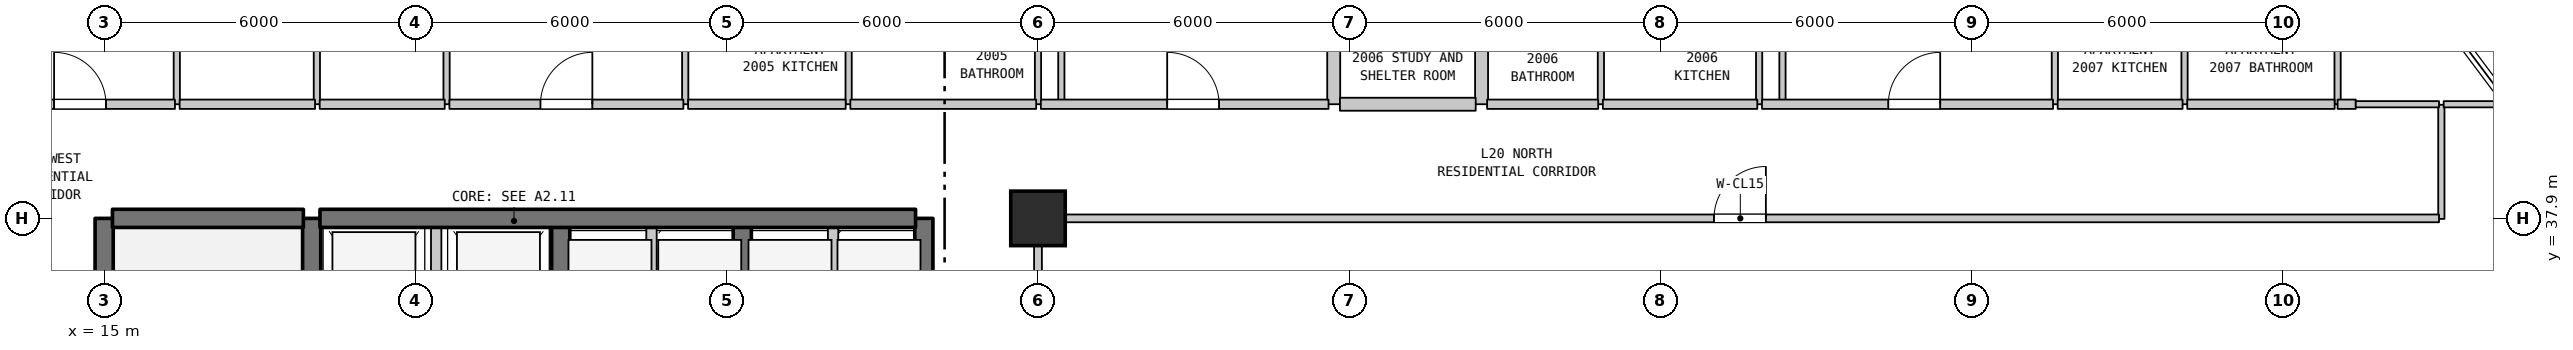
"""IFC4 building model, lengths in metres.
Left out: names, types, materials, properties, quantities, classifications, styles, units other than length and angle.
Written with IfcOpenShell. Run it as: python <this file> out.ifc"""

import sys

from ifc_helpers import new_model, si_unit, direction, frame, frame_2d, origin, origin_2d, place, context, subcontext, project, spatial, rectangle, extrude, element, fill, save


model = new_model("IFC4")
c1 = context("Model", 3, precision=1e-05, world=origin(), true_north=direction((0.0, 1.0)))
c2 = subcontext(c1, "Body", "Model", "MODEL_VIEW")
j1 = project(units=[si_unit("LENGTHUNIT", "METRE"), si_unit("PLANEANGLEUNIT", "RADIAN")], contexts=[c1])
p1 = place(None, origin())
s1 = spatial("IfcSite", under=j1, at=p1, CompositionType="ELEMENT")
p2 = place(p1, origin())
s2 = spatial("IfcBuilding", under=s1, at=p2, CompositionType="ELEMENT")
p3 = place(p2, frame((0.0, 0.0, 86.4)))
s3 = spatial("IfcBuildingStorey", under=s2, at=p3, CompositionType="ELEMENT", Elevation=86.4)
p4 = place(p3, frame((33.0, 37.9, 0.0), z_axis=(0.0, 0.0, 1.0), x_axis=(1.0, 0.0, 0.0)))
e1 = element("IfcColumn", 1, at=p4, inside=s3, PredefinedType="COLUMN", context=c2, shape_type="SweptSolid", body=[
    extrude(rectangle(XDim=1.05, YDim=1.05, at=origin_2d()), origin(), (0.0, 0.0, 1.0), 4.5),
])
p5 = place(p3, frame((15.0, 31.1, 0.0), z_axis=(0.0, 0.0, 1.0), x_axis=(0.0, 1.0, 0.0)))
e2 = element("IfcWall", 2, at=p5, inside=s3, PredefinedType="SHEAR", context=c2, shape_type="SweptSolid", body=[
    extrude(rectangle(XDim=6.8, YDim=0.35, at=frame_2d((3.4, 0.0))), origin(), (0.0, 0.0, 1.0), 4.185),
])
p6 = place(p3, frame((16.4, 40.1, 0.0), z_axis=(0.0, 0.0, 1.0), x_axis=(0.0, 1.0, 0.0)))
e3 = element("IfcWall", 3, at=p6, inside=s3, PredefinedType="PARTITIONING", context=c2, shape_type="SweptSolid", body=[
    extrude(rectangle(XDim=3.2, YDim=0.12, at=frame_2d((1.6, 0.0))), origin(), (0.0, 0.0, 1.0), 4.185),
])
p7 = place(p3, frame((19.0, 35.0, 0.0), z_axis=(0.0, 0.0, 1.0), x_axis=(0.0, 1.0, 0.0)))
e4 = element("IfcWall", 4, at=p7, inside=s3, PredefinedType="SHEAR", context=c2, shape_type="SweptSolid", body=[
    extrude(rectangle(XDim=2.9, YDim=0.35, at=frame_2d((1.45, 0.0))), origin(), (0.0, 0.0, 1.0), 4.185),
])
p8 = place(p3, frame((19.1, 40.1, 0.0), z_axis=(0.0, 0.0, 1.0), x_axis=(0.0, 1.0, 0.0)))
e5 = element("IfcWall", 5, at=p8, inside=s3, PredefinedType="PARTITIONING", context=c2, shape_type="SweptSolid", body=[
    extrude(rectangle(XDim=3.2, YDim=0.12, at=frame_2d((1.6, 0.0))), origin(), (0.0, 0.0, 1.0), 4.185),
])
p9 = place(p8, frame((1.15, 0.0, 0.0)))
e6 = element("IfcOpeningElement", 6, at=p9, cuts=e5, PredefinedType="OPENING", context=c2, shape_type="SweptSolid", body=[
    extrude(rectangle(XDim=0.9, YDim=2.15, at=frame_2d((0.45, 1.075))), frame((0.0, 0.07, 0.0), z_axis=(0.0, -1.0, 0.0), x_axis=(1.0, 0.0, 0.0)), (0.0, 0.0, 1.0), 0.14),
])
p10 = place(p3, frame((21.4, 35.0, 0.0), z_axis=(0.0, 0.0, 1.0), x_axis=(0.0, 1.0, 0.0)))
e7 = element("IfcWall", 7, at=p10, inside=s3, PredefinedType="STANDARD", context=c2, shape_type="SweptSolid", body=[
    extrude(rectangle(XDim=2.9, YDim=0.2, at=frame_2d((1.45, 0.0))), origin(), (0.0, 0.0, 1.0), 4.185),
])
p11 = place(p3, frame((21.6, 40.1, 0.0), z_axis=(0.0, 0.0, 1.0), x_axis=(0.0, 1.0, 0.0)))
e8 = element("IfcWall", 8, at=p11, inside=s3, PredefinedType="PARTITIONING", context=c2, shape_type="SweptSolid", body=[
    extrude(rectangle(XDim=13.79, YDim=0.12, at=frame_2d((6.895, 0.0))), origin(), (0.0, 0.0, 1.0), 4.185),
])
p12 = place(p3, frame((23.8, 35.0, 0.0), z_axis=(0.0, 0.0, 1.0), x_axis=(0.0, 1.0, 0.0)))
e9 = element("IfcWall", 9, at=p12, inside=s3, PredefinedType="SHEAR", context=c2, shape_type="SweptSolid", body=[
    extrude(rectangle(XDim=2.9, YDim=0.35, at=frame_2d((1.45, 0.0))), origin(), (0.0, 0.0, 1.0), 4.185),
])
p13 = place(p3, frame((25.55, 35.0, 0.0), z_axis=(0.0, 0.0, 1.0), x_axis=(0.0, 1.0, 0.0)))
e10 = element("IfcWall", 10, at=p13, inside=s3, PredefinedType="STANDARD", context=c2, shape_type="SweptSolid", body=[
    extrude(rectangle(XDim=2.9, YDim=0.2, at=frame_2d((1.45, 0.0))), origin(), (0.0, 0.0, 1.0), 4.185),
])
p14 = place(p3, frame((26.2, 40.1, 0.0), z_axis=(0.0, 0.0, 1.0), x_axis=(0.0, 1.0, 0.0)))
e11 = element("IfcWall", 11, at=p14, inside=s3, PredefinedType="PARTITIONING", context=c2, shape_type="SweptSolid", body=[
    extrude(rectangle(XDim=2.3, YDim=0.12, at=frame_2d((1.15, 0.0))), origin(), (0.0, 0.0, 1.0), 4.185),
])
p15 = place(p3, frame((27.3, 35.0, 0.0), z_axis=(0.0, 0.0, 1.0), x_axis=(0.0, 1.0, 0.0)))
e12 = element("IfcWall", 12, at=p15, inside=s3, PredefinedType="SHEAR", context=c2, shape_type="SweptSolid", body=[
    extrude(rectangle(XDim=2.9, YDim=0.35, at=frame_2d((1.45, 0.0))), origin(), (0.0, 0.0, 1.0), 4.185),
])
p16 = place(p3, frame((29.05, 35.0, 0.0), z_axis=(0.0, 0.0, 1.0), x_axis=(0.0, 1.0, 0.0)))
e13 = element("IfcWall", 13, at=p16, inside=s3, PredefinedType="STANDARD", context=c2, shape_type="SweptSolid", body=[
    extrude(rectangle(XDim=2.9, YDim=0.2, at=frame_2d((1.45, 0.0))), origin(), (0.0, 0.0, 1.0), 4.185),
])
p17 = place(p3, frame((29.35, 40.1, 0.0), z_axis=(0.0, 0.0, 1.0), x_axis=(0.0, 1.0, 0.0)))
e14 = element("IfcWall", 14, at=p17, inside=s3, PredefinedType="PARTITIONING", context=c2, shape_type="SweptSolid", body=[
    extrude(rectangle(XDim=2.3, YDim=0.12, at=frame_2d((1.15, 0.0))), origin(), (0.0, 0.0, 1.0), 4.185),
])
p18 = place(p3, frame((30.8, 35.0, 0.0), z_axis=(0.0, 0.0, 1.0), x_axis=(0.0, 1.0, 0.0)))
e15 = element("IfcWall", 15, at=p18, inside=s3, PredefinedType="SHEAR", context=c2, shape_type="SweptSolid", body=[
    extrude(rectangle(XDim=2.9, YDim=0.35, at=frame_2d((1.45, 0.0))), origin(), (0.0, 0.0, 1.0), 4.185),
])
p19 = place(p3, frame((33.0, 27.91, 0.0), z_axis=(0.0, 0.0, 1.0), x_axis=(0.0, 1.0, 0.0)))
e16 = element("IfcWall", 16, at=p19, inside=s3, PredefinedType="STANDARD", context=c2, shape_type="SweptSolid", body=[
    extrude(rectangle(XDim=9.98, YDim=0.15, at=frame_2d((4.99, 0.0))), origin(), (0.0, 0.0, 1.0), 3.685),
])
p20 = place(p3, frame((33.0, 40.1, 0.0), z_axis=(0.0, 0.0, 1.0), x_axis=(0.0, 1.0, 0.0)))
e17 = element("IfcWall", 17, at=p20, inside=s3, PredefinedType="PARTITIONING", context=c2, shape_type="SweptSolid", body=[
    extrude(rectangle(XDim=2.3, YDim=0.12, at=frame_2d((1.15, 0.0))), origin(), (0.0, 0.0, 1.0), 3.585),
])
p21 = place(p3, frame((33.45, 40.1, 0.0), z_axis=(0.0, 0.0, 1.0), x_axis=(0.0, 1.0, 0.0)))
e18 = element("IfcWall", 18, at=p21, inside=s3, PredefinedType="PARTITIONING", context=c2, shape_type="SweptSolid", body=[
    extrude(rectangle(XDim=2.05, YDim=0.12, at=frame_2d((1.025, 0.0))), origin(), (0.0, 0.0, 1.0), 4.185),
])
for number, where, z_axis, x_axis in (
    (19, (38.7, 40.1, 0.0), (0.0, 0.0, 1.0), (0.0, 1.0, 0.0)),
    (20, (41.55, 40.1, 0.0), (0.0, 0.0, 1.0), (0.0, 1.0, 0.0)),
):
    element("IfcWall", number, at=place(p3, frame(where, z_axis=z_axis, x_axis=x_axis)), inside=s3, PredefinedType="STANDARD", context=c2, shape_type="SweptSolid", body=[
        extrude(rectangle(XDim=2.3, YDim=0.25, at=frame_2d((1.15, 0.0))), origin(), (0.0, 0.0, 1.0), 4.185),
    ])
for number, where, z_axis, x_axis in (
    (21, (43.85, 40.1, 0.0), (0.0, 0.0, 1.0), (0.0, 1.0, 0.0)),
    (22, (46.9, 40.1, 0.0), (0.0, 0.0, 1.0), (0.0, 1.0, 0.0)),
):
    element("IfcWall", number, at=place(p3, frame(where, z_axis=z_axis, x_axis=x_axis)), inside=s3, PredefinedType="PARTITIONING", context=c2, shape_type="SweptSolid", body=[
        extrude(rectangle(XDim=2.3, YDim=0.12, at=frame_2d((1.15, 0.0))), origin(), (0.0, 0.0, 1.0), 4.185),
    ])
p22 = place(p3, frame((47.35, 40.1, 0.0), z_axis=(0.0, 0.0, 1.0), x_axis=(0.0, 1.0, 0.0)))
e23 = element("IfcWall", 23, at=p22, inside=s3, PredefinedType="PARTITIONING", context=c2, shape_type="SweptSolid", body=[
    extrude(rectangle(XDim=2.05, YDim=0.12, at=frame_2d((1.025, 0.0))), origin(), (0.0, 0.0, 1.0), 4.185),
])
for number, where, z_axis, x_axis in (
    (24, (52.6, 40.1, 0.0), (0.0, 0.0, 1.0), (0.0, 1.0, 0.0)),
    (25, (55.1, 40.1, 0.0), (0.0, 0.0, 1.0), (0.0, 1.0, 0.0)),
    (26, (58.05, 40.1, 0.0), (0.0, 0.0, 1.0), (0.0, 1.0, 0.0)),
):
    element("IfcWall", number, at=place(p3, frame(where, z_axis=z_axis, x_axis=x_axis)), inside=s3, PredefinedType="PARTITIONING", context=c2, shape_type="SweptSolid", body=[
        extrude(rectangle(XDim=2.3, YDim=0.12, at=frame_2d((1.15, 0.0))), origin(), (0.0, 0.0, 1.0), 4.185),
    ])
p23 = place(p3, frame((60.05, 37.89, 0.0), z_axis=(0.0, 0.0, 1.0), x_axis=(0.0, 1.0, 0.0)))
e27 = element("IfcWall", 27, at=p23, inside=s3, PredefinedType="PARTITIONING", context=c2, shape_type="SweptSolid", body=[
    extrude(rectangle(XDim=2.2, YDim=0.12, at=frame_2d((1.1, 0.0))), origin(), (0.0, 0.0, 1.0), 4.185),
])
p24 = place(p3, frame((15.16, 37.9, 0.0), z_axis=(0.0, 0.0, 1.0), x_axis=(1.0, 0.0, 0.0)))
e28 = element("IfcWall", 28, at=p24, inside=s3, PredefinedType="SHEAR", context=c2, shape_type="SweptSolid", body=[
    extrude(rectangle(XDim=3.68, YDim=0.35, at=frame_2d((1.84, 0.0))), origin(), (0.0, 0.0, 1.0), 4.185),
])
p25 = place(p3, frame((19.16, 37.9, 0.0), z_axis=(0.0, 0.0, 1.0), x_axis=(1.0, 0.0, 0.0)))
e29 = element("IfcWall", 29, at=p25, inside=s3, PredefinedType="SHEAR", context=c2, shape_type="SweptSolid", body=[
    extrude(rectangle(XDim=11.48, YDim=0.35, at=frame_2d((5.74, 0.0))), origin(), (0.0, 0.0, 1.0), 4.185),
])
p26 = place(p3, frame((33.07, 37.9, 0.0), z_axis=(0.0, 0.0, 1.0), x_axis=(1.0, 0.0, 0.0)))
e30 = element("IfcWall", 30, at=p26, inside=s3, PredefinedType="STANDARD", context=c2, shape_type="SweptSolid", body=[
    extrude(rectangle(XDim=26.935, YDim=0.15, at=frame_2d((13.467, 0.0))), origin(), (0.0, 0.0, 1.0), 4.185),
])
p27 = place(p26, frame((12.96, 0.0, 0.0)))
e31 = element("IfcOpeningElement", 31, at=p27, cuts=e30, PredefinedType="OPENING", context=c2, shape_type="SweptSolid", body=[
    extrude(rectangle(XDim=1.0, YDim=2.15, at=frame_2d((0.5, 1.075))), frame((0.0, 0.085, 0.0), z_axis=(0.0, -1.0, 0.0), x_axis=(1.0, 0.0, 0.0)), (0.0, 0.0, 1.0), 0.17),
])
p28 = place(p3, frame((12.875, 40.1, 0.0), z_axis=(0.0, 0.0, 1.0), x_axis=(1.0, 0.0, 0.0)))
e32 = element("IfcWall", 32, at=p28, inside=s3, PredefinedType="STANDARD", context=c2, shape_type="SweptSolid", body=[
    extrude(rectangle(XDim=3.49, YDim=0.18, at=frame_2d((1.745, 0.0))), origin(), (0.0, 0.0, 1.0), 4.185),
])
p29 = place(p28, frame((1.16, 0.0, 0.0)))
e33 = element("IfcOpeningElement", 33, at=p29, cuts=e32, PredefinedType="OPENING", context=c2, shape_type="SweptSolid", body=[
    extrude(rectangle(XDim=1.0, YDim=2.15, at=frame_2d((0.5, 1.075))), frame((0.0, 0.1, 0.0), z_axis=(0.0, -1.0, 0.0), x_axis=(1.0, 0.0, 0.0)), (0.0, 0.0, 1.0), 0.2),
])
p30 = place(p3, frame((16.455, 40.1, 0.0), z_axis=(0.0, 0.0, 1.0), x_axis=(1.0, 0.0, 0.0)))
e34 = element("IfcWall", 34, at=p30, inside=s3, PredefinedType="STANDARD", context=c2, shape_type="SweptSolid", body=[
    extrude(rectangle(XDim=2.61, YDim=0.18, at=frame_2d((1.305, 0.0))), origin(), (0.0, 0.0, 1.0), 4.185),
])
p31 = place(p3, frame((19.155, 40.1, 0.0), z_axis=(0.0, 0.0, 1.0), x_axis=(1.0, 0.0, 0.0)))
e35 = element("IfcWall", 35, at=p31, inside=s3, PredefinedType="STANDARD", context=c2, shape_type="SweptSolid", body=[
    extrude(rectangle(XDim=2.41, YDim=0.18, at=frame_2d((1.205, 0.0))), origin(), (0.0, 0.0, 1.0), 4.185),
])
p32 = place(p3, frame((21.655, 40.1, 0.0), z_axis=(0.0, 0.0, 1.0), x_axis=(1.0, 0.0, 0.0)))
e36 = element("IfcWall", 36, at=p32, inside=s3, PredefinedType="STANDARD", context=c2, shape_type="SweptSolid", body=[
    extrude(rectangle(XDim=4.51, YDim=0.18, at=frame_2d((2.255, 0.0))), origin(), (0.0, 0.0, 1.0), 4.185),
])
p33 = place(p32, frame((1.755, 0.0, 0.0)))
e37 = element("IfcOpeningElement", 37, at=p33, cuts=e36, PredefinedType="OPENING", context=c2, shape_type="SweptSolid", body=[
    extrude(rectangle(XDim=1.0, YDim=2.15, at=frame_2d((0.5, 1.075))), frame((0.0, 0.1, 0.0), z_axis=(0.0, -1.0, 0.0), x_axis=(1.0, 0.0, 0.0)), (0.0, 0.0, 1.0), 0.2),
])
p34 = place(p3, frame((26.255, 40.1, 0.0), z_axis=(0.0, 0.0, 1.0), x_axis=(1.0, 0.0, 0.0)))
e38 = element("IfcWall", 38, at=p34, inside=s3, PredefinedType="STANDARD", context=c2, shape_type="SweptSolid", body=[
    extrude(rectangle(XDim=3.038, YDim=0.18, at=frame_2d((1.519, 0.0))), origin(), (0.0, 0.0, 1.0), 4.185),
])
p35 = place(p3, frame((29.383, 40.1, 0.0), z_axis=(0.0, 0.0, 1.0), x_axis=(1.0, 0.0, 0.0)))
e39 = element("IfcWall", 39, at=p35, inside=s3, PredefinedType="STANDARD", context=c2, shape_type="SweptSolid", body=[
    extrude(rectangle(XDim=3.582, YDim=0.18, at=frame_2d((1.791, 0.0))), origin(), (0.0, 0.0, 1.0), 4.185),
])
p36 = place(p3, frame((33.055, 40.1, 0.0), z_axis=(0.0, 0.0, 1.0), x_axis=(1.0, 0.0, 0.0)))
e40 = element("IfcWall", 40, at=p36, inside=s3, PredefinedType="STANDARD", context=c2, shape_type="SweptSolid", body=[
    extrude(rectangle(XDim=5.545, YDim=0.18, at=frame_2d((2.772, 0.0))), origin(), (0.0, 0.0, 1.0), 4.185),
])
p37 = place(p36, frame((2.435, 0.0, 0.0)))
e41 = element("IfcOpeningElement", 41, at=p37, cuts=e40, PredefinedType="OPENING", context=c2, shape_type="SweptSolid", body=[
    extrude(rectangle(XDim=1.0, YDim=2.15, at=frame_2d((0.5, 1.075))), frame((0.0, 0.1, 0.0), z_axis=(0.0, -1.0, 0.0), x_axis=(1.0, 0.0, 0.0)), (0.0, 0.0, 1.0), 0.2),
])
p38 = place(p3, frame((38.82, 40.1, 0.0), z_axis=(0.0, 0.0, 1.0), x_axis=(1.0, 0.0, 0.0)))
e42 = element("IfcWall", 42, at=p38, inside=s3, PredefinedType="STANDARD", context=c2, shape_type="SweptSolid", body=[
    extrude(rectangle(XDim=2.617, YDim=0.25, at=frame_2d((1.309, 0.0))), origin(), (0.0, 0.0, 1.0), 4.185),
])
p39 = place(p3, frame((41.657, 40.1, 0.0), z_axis=(0.0, 0.0, 1.0), x_axis=(1.0, 0.0, 0.0)))
e43 = element("IfcWall", 43, at=p39, inside=s3, PredefinedType="STANDARD", context=c2, shape_type="SweptSolid", body=[
    extrude(rectangle(XDim=2.141, YDim=0.18, at=frame_2d((1.071, 0.0))), origin(), (0.0, 0.0, 1.0), 4.185),
])
p40 = place(p3, frame((43.888, 40.1, 0.0), z_axis=(0.0, 0.0, 1.0), x_axis=(1.0, 0.0, 0.0)))
e44 = element("IfcWall", 44, at=p40, inside=s3, PredefinedType="STANDARD", context=c2, shape_type="SweptSolid", body=[
    extrude(rectangle(XDim=2.977, YDim=0.18, at=frame_2d((1.489, 0.0))), origin(), (0.0, 0.0, 1.0), 4.185),
])
p41 = place(p3, frame((46.955, 40.1, 0.0), z_axis=(0.0, 0.0, 1.0), x_axis=(1.0, 0.0, 0.0)))
e45 = element("IfcWall", 45, at=p41, inside=s3, PredefinedType="STANDARD", context=c2, shape_type="SweptSolid", body=[
    extrude(rectangle(XDim=5.61, YDim=0.18, at=frame_2d((2.805, 0.0))), origin(), (0.0, 0.0, 1.0), 4.185),
])
p42 = place(p41, frame((2.435, 0.0, 0.0)))
e46 = element("IfcOpeningElement", 46, at=p42, cuts=e45, PredefinedType="OPENING", context=c2, shape_type="SweptSolid", body=[
    extrude(rectangle(XDim=1.0, YDim=2.15, at=frame_2d((0.5, 1.075))), frame((0.0, 0.1, 0.0), z_axis=(0.0, -1.0, 0.0), x_axis=(1.0, 0.0, 0.0)), (0.0, 0.0, 1.0), 0.2),
])
p43 = place(p3, frame((52.655, 40.1, 0.0), z_axis=(0.0, 0.0, 1.0), x_axis=(1.0, 0.0, 0.0)))
e47 = element("IfcWall", 47, at=p43, inside=s3, PredefinedType="STANDARD", context=c2, shape_type="SweptSolid", body=[
    extrude(rectangle(XDim=2.407, YDim=0.18, at=frame_2d((1.204, 0.0))), origin(), (0.0, 0.0, 1.0), 4.185),
])
p44 = place(p3, frame((55.152, 40.1, 0.0), z_axis=(0.0, 0.0, 1.0), x_axis=(1.0, 0.0, 0.0)))
e48 = element("IfcWall", 48, at=p44, inside=s3, PredefinedType="STANDARD", context=c2, shape_type="SweptSolid", body=[
    extrude(rectangle(XDim=2.841, YDim=0.18, at=frame_2d((1.42, 0.0))), origin(), (0.0, 0.0, 1.0), 4.185),
])
p45 = place(p3, frame((58.05, 40.1, 0.0), z_axis=(0.0, 0.0, 1.0), x_axis=(1.0, 0.0, 0.0)))
e49 = element("IfcWall", 49, at=p45, inside=s3, PredefinedType="STANDARD", context=c2, shape_type="SweptSolid", body=[
    extrude(rectangle(XDim=0.35, YDim=0.18, at=frame_2d((0.175, 0.0))), origin(), (0.0, 0.0, 1.0), 4.185),
])
p46 = place(p3, frame((58.4, 40.1, 0.0), z_axis=(0.0, 0.0, 1.0), x_axis=(1.0, 0.0, 0.0)))
e50 = element("IfcWall", 50, at=p46, inside=s3, PredefinedType="PARTITIONING", context=c2, shape_type="SweptSolid", body=[
    extrude(rectangle(XDim=1.605, YDim=0.12, at=frame_2d((0.802, 0.0))), origin(), (0.0, 0.0, 1.0), 4.185),
])
p47 = place(p3, frame((60.095, 40.1, 0.0), z_axis=(0.0, 0.0, 1.0), x_axis=(1.0, 0.0, 0.0)))
e51 = element("IfcWall", 51, at=p47, inside=s3, PredefinedType="PARTITIONING", context=c2, shape_type="SweptSolid", body=[
    extrude(rectangle(XDim=1.245, YDim=0.12, at=frame_2d((0.623, 0.0))), origin(), (0.0, 0.0, 1.0), 4.185),
])
p48 = place(p27, origin())
e52 = element("IfcDoor", 52, at=p48, inside=s3, OperationType="SINGLE_SWING_RIGHT", PredefinedType="DOOR", context=c2, shape_type="SweptSolid", body=[
    extrude(rectangle(XDim=1.0, YDim=2.15, at=frame_2d((0.5, 1.075))), frame((0.0, 0.025, 0.0), z_axis=(0.0, -1.0, 0.0), x_axis=(1.0, 0.0, 0.0)), (0.0, 0.0, 1.0), 0.05),
])
fill(e31, e52)
p49 = place(p29, origin())
e53 = element("IfcDoor", 53, at=p49, inside=s3, OperationType="SINGLE_SWING_LEFT", PredefinedType="DOOR", context=c2, shape_type="SweptSolid", body=[
    extrude(rectangle(XDim=1.0, YDim=2.15, at=frame_2d((0.5, 1.075))), frame((0.0, 0.025, 0.0), z_axis=(0.0, -1.0, 0.0), x_axis=(1.0, 0.0, 0.0)), (0.0, 0.0, 1.0), 0.05),
])
fill(e33, e53)
p50 = place(p33, origin())
e54 = element("IfcDoor", 54, at=p50, inside=s3, OperationType="SINGLE_SWING_RIGHT", PredefinedType="DOOR", context=c2, shape_type="SweptSolid", body=[
    extrude(rectangle(XDim=1.0, YDim=2.15, at=frame_2d((0.5, 1.075))), frame((0.0, 0.025, 0.0), z_axis=(0.0, -1.0, 0.0), x_axis=(1.0, 0.0, 0.0)), (0.0, 0.0, 1.0), 0.05),
])
fill(e37, e54)
p51 = place(p37, origin())
e55 = element("IfcDoor", 55, at=p51, inside=s3, OperationType="SINGLE_SWING_LEFT", PredefinedType="DOOR", context=c2, shape_type="SweptSolid", body=[
    extrude(rectangle(XDim=1.0, YDim=2.15, at=frame_2d((0.5, 1.075))), frame((0.0, 0.025, 0.0), z_axis=(0.0, -1.0, 0.0), x_axis=(1.0, 0.0, 0.0)), (0.0, 0.0, 1.0), 0.05),
])
fill(e41, e55)
p52 = place(p42, origin())
e56 = element("IfcDoor", 56, at=p52, inside=s3, OperationType="SINGLE_SWING_RIGHT", PredefinedType="DOOR", context=c2, shape_type="SweptSolid", body=[
    extrude(rectangle(XDim=1.0, YDim=2.15, at=frame_2d((0.5, 1.075))), frame((0.0, 0.025, 0.0), z_axis=(0.0, -1.0, 0.0), x_axis=(1.0, 0.0, 0.0)), (0.0, 0.0, 1.0), 0.05),
])
fill(e46, e56)
save(model, sys.argv[1])
